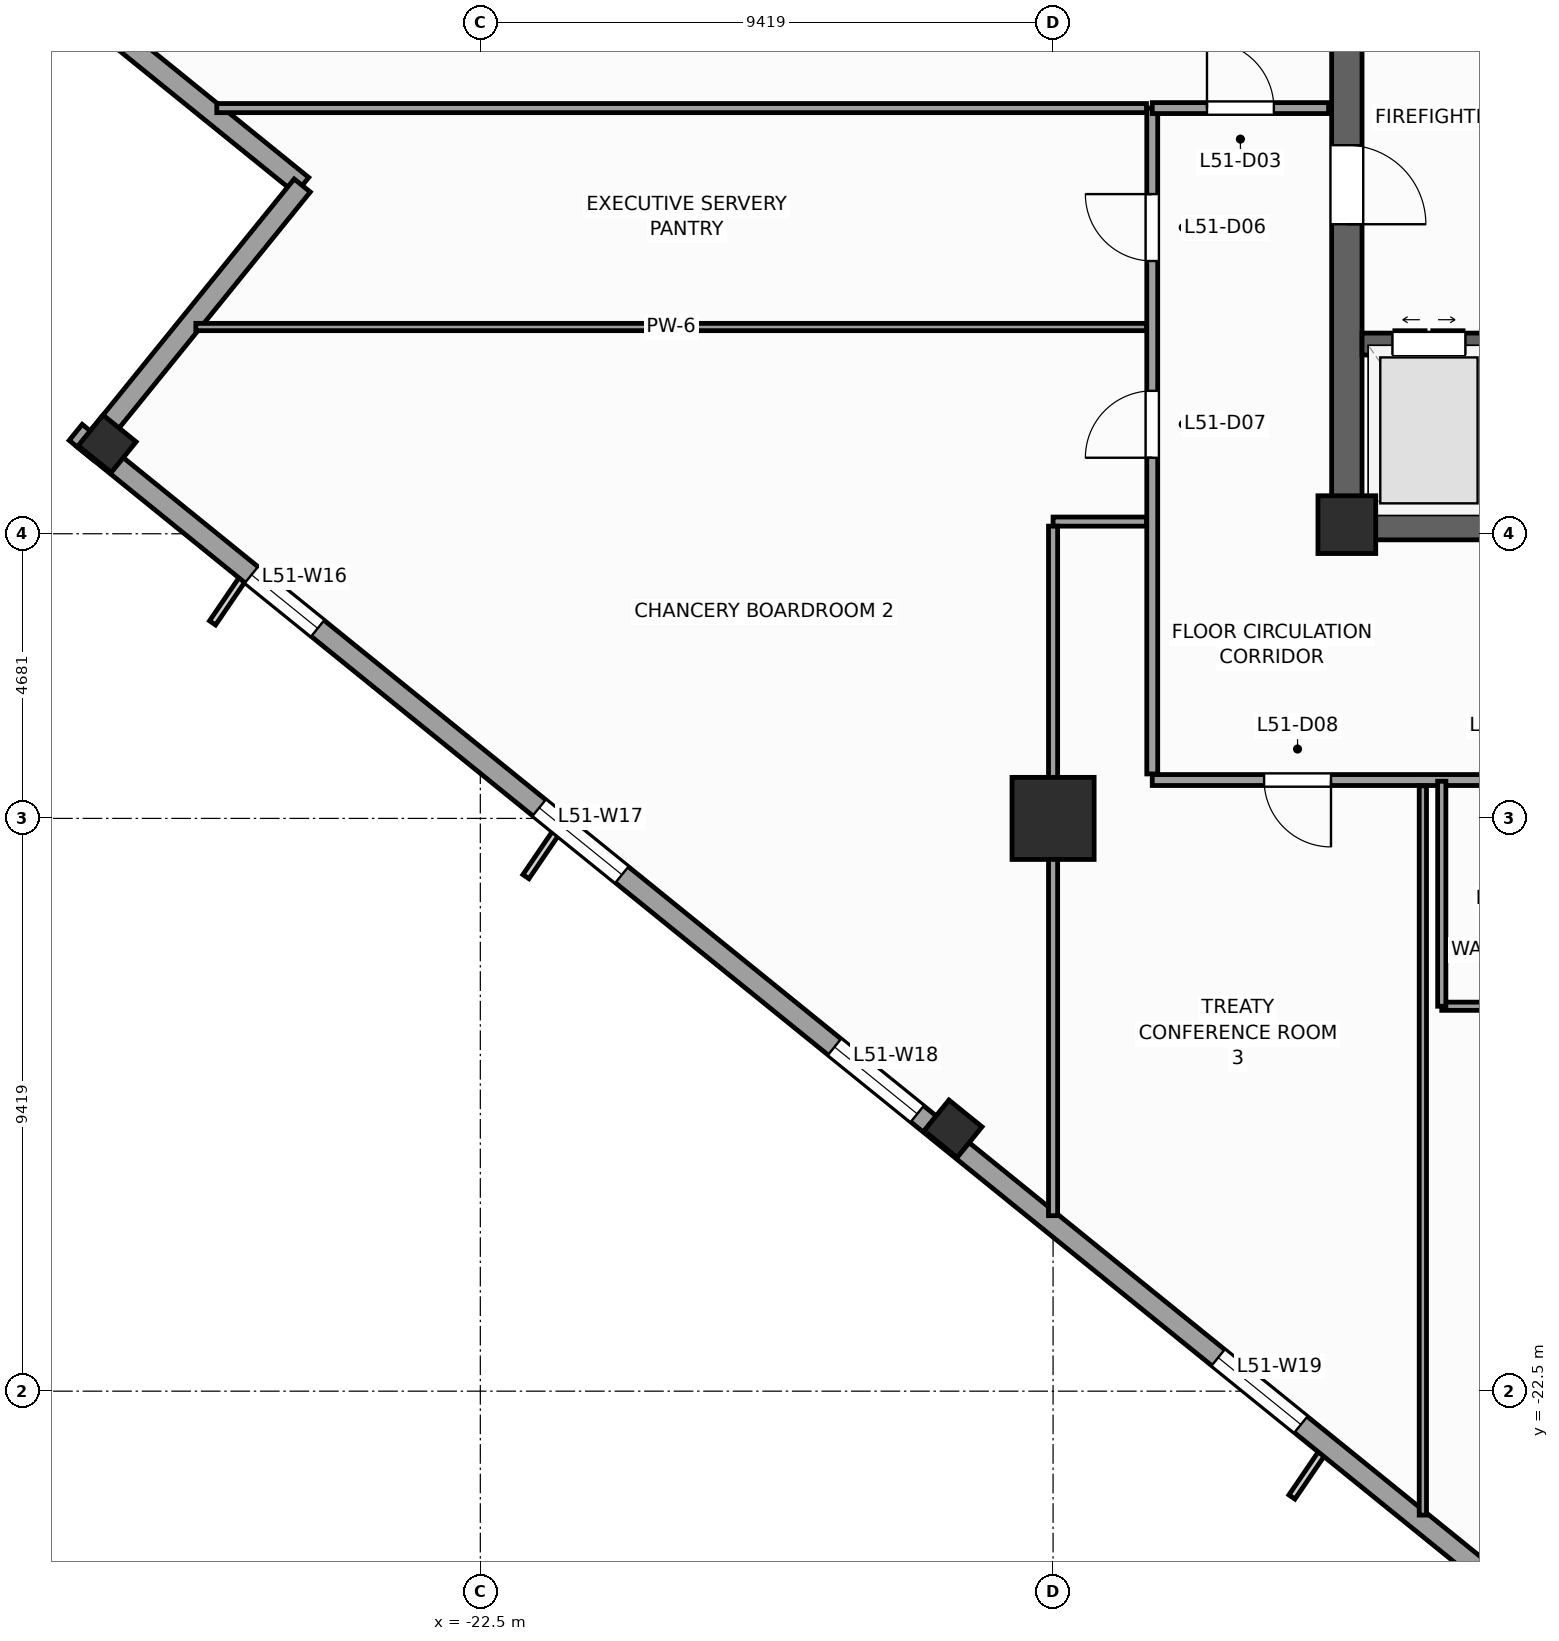
"""IFC4 building model, lengths in metres.
Left out: names, types, materials, properties, quantities, classifications, styles, units other than length and angle.
Written with IfcOpenShell. Run it as: python <this file> out.ifc"""

import sys

from ifc_helpers import new_model, si_unit, direction, frame, frame_2d, origin, origin_2d, place, context, subcontext, project, spatial, rectangle, extrude, source, transform, mapped, element, fill, save


model = new_model("IFC4")
c1 = context("Model", 3, precision=1e-05, world=origin(), true_north=direction((0.0, 1.0)))
c2 = subcontext(c1, "Body", "Model", "MODEL_VIEW")
j1 = project(units=[si_unit("LENGTHUNIT", "METRE"), si_unit("PLANEANGLEUNIT", "RADIAN")], contexts=[c1])
p1 = place(None, origin())
s1 = spatial("IfcSite", under=j1, at=p1, CompositionType="ELEMENT")
p2 = place(p1, origin())
s2 = spatial("IfcBuilding", under=s1, at=p2, CompositionType="ELEMENT")
p3 = place(p2, frame((0.0, 0.0, 213.4)))
s3 = spatial("IfcBuildingStorey", under=s2, at=p3, CompositionType="ELEMENT", Elevation=213.4)
p4 = place(p3, frame((-8.5, -8.25, 0.0), z_axis=(0.0, 0.0, 1.0), x_axis=(1.0, 0.0, 0.0)))
e1 = element("IfcWall", 1, at=p4, inside=s3, PredefinedType="SHEAR", context=c2, shape_type="SweptSolid", body=[
    extrude(rectangle(XDim=17.0, YDim=0.5, at=frame_2d((8.5, 0.0))), origin(), (0.0, 0.0, 1.0), 3.9),
])
p5 = place(p4, frame((7.85, 0.0, 0.0)))
e2 = element("IfcOpeningElement", 2, at=p5, cuts=e1, PredefinedType="OPENING", context=c2, shape_type="SweptSolid", body=[
    extrude(rectangle(XDim=1.3, YDim=2.2, at=frame_2d((0.65, 1.1))), frame((0.0, 0.26, 0.0), z_axis=(0.0, -1.0, 0.0), x_axis=(1.0, 0.0, 0.0)), (0.0, 0.0, 1.0), 0.52),
])
p6 = place(p3, frame((-8.25, -8.0, 0.0), z_axis=(0.0, 0.0, 1.0), x_axis=(0.0, 1.0, 0.0)))
e3 = element("IfcWall", 3, at=p6, inside=s3, PredefinedType="SHEAR", context=c2, shape_type="SweptSolid", body=[
    extrude(rectangle(XDim=16.0, YDim=0.5, at=frame_2d((8.0, 0.0))), origin(), (0.0, 0.0, 1.0), 3.9),
])
p7 = place(p6, frame((4.69, 0.0, 0.0)))
e4 = element("IfcOpeningElement", 4, at=p7, cuts=e3, PredefinedType="OPENING", context=c2, shape_type="SweptSolid", body=[
    extrude(rectangle(XDim=1.3, YDim=2.2, at=frame_2d((0.65, 1.1))), frame((0.0, 0.26, 0.0), z_axis=(0.0, -1.0, 0.0), x_axis=(1.0, 0.0, 0.0)), (0.0, 0.0, 1.0), 0.52),
])
p8 = place(p3, frame((-8.0, -5.28, 0.0), z_axis=(0.0, 0.0, 1.0), x_axis=(1.0, 0.0, 0.0)))
e5 = element("IfcWall", 5, at=p8, inside=s3, PredefinedType="SHEAR", context=c2, shape_type="SweptSolid", body=[
    extrude(rectangle(XDim=3.46, YDim=0.36, at=frame_2d((1.73, 0.0))), origin(), (0.0, 0.0, 1.0), 3.9),
])
p9 = place(p8, frame((0.5, 0.0, 0.0)))
e6 = element("IfcOpeningElement", 6, at=p9, cuts=e5, PredefinedType="OPENING", context=c2, shape_type="SweptSolid", body=[
    extrude(rectangle(XDim=1.2, YDim=2.25, at=frame_2d((0.6, 1.125))), frame((0.0, 0.19, 0.0), z_axis=(0.0, -1.0, 0.0), x_axis=(1.0, 0.0, 0.0)), (0.0, 0.0, 1.0), 0.38),
])
m1 = source(origin(), c2, "Body", "SweptSolid", [
    extrude(rectangle(XDim=0.95, YDim=0.95, at=origin_2d()), origin(), (0.0, 0.0, 1.0), 3.9),
])
p10 = place(p3, frame((-8.25, -8.25, 0.0), z_axis=(0.0, 0.0, 1.0), x_axis=(1.0, 0.0, 0.0)))
e7 = element("IfcColumn", 7, at=p10, inside=s3, PredefinedType="PILASTER", context=c2, shape_type="MappedRepresentation", body=[
    mapped(m1, transform((0.0, 0.0, 0.0), scale=1.0)),
])
m2 = source(origin(), c2, "Body", "SweptSolid", [
    extrude(rectangle(XDim=1.35, YDim=1.35, at=origin_2d()), origin(), (0.0, 0.0, 1.0), 3.9),
])
p11 = place(p3, frame((-13.081, -13.081, 0.0), z_axis=(0.0, 0.0, 1.0), x_axis=(1.0, 0.0, 0.0)))
e8 = element("IfcColumn", 8, at=p11, inside=s3, PredefinedType="COLUMN", context=c2, shape_type="MappedRepresentation", body=[
    mapped(m2, transform((0.0, 0.0, 0.0), scale=1.0)),
])
m3 = source(origin(), c2, "Body", "SweptSolid", [
    extrude(rectangle(XDim=0.65, YDim=0.7, at=origin_2d()), origin(), (0.0, 0.0, 1.0), 3.9),
])
for number, where, z_axis, x_axis in (
    (9, (-28.637, -6.92, 0.0), (0.0, 0.0, 1.0), (0.629, 0.777, 0.0)),
    (10, (-14.726, -18.185, 0.0), (0.0, 0.0, 1.0), (0.629, 0.777, 0.0)),
):
    element("IfcColumn", number, at=place(p3, frame(where, z_axis=z_axis, x_axis=x_axis)), inside=s3, PredefinedType="COLUMN", context=c2, shape_type="MappedRepresentation", body=[
        mapped(m3, transform((0.0, 0.0, 0.0), scale=1.0)),
    ])
p12 = place(p3, frame((-29.703, 0.789, 0.0), z_axis=(0.0, 0.0, 1.0), x_axis=(0.77714355312, -0.629323365087, 0.0)))
e11 = element("IfcWall", 11, at=p12, inside=s3, PredefinedType="STANDARD", context=c2, shape_type="SweptSolid", body=[
    extrude(rectangle(XDim=5.5, YDim=0.34, at=frame_2d((2.75, 0.0))), origin(), (0.0, 0.0, 1.0), 3.66),
])
p13 = place(p3, frame((-25.429, -2.673, 0.0), z_axis=(0.0, 0.0, 1.0), x_axis=(-0.629299794138, -0.777162640055, 0.0)))
e12 = element("IfcWall", 12, at=p13, inside=s3, PredefinedType="STANDARD", context=c2, shape_type="SweptSolid", body=[
    extrude(rectangle(XDim=5.67, YDim=0.34, at=frame_2d((2.835, 0.0))), origin(), (0.0, 0.0, 1.0), 3.66),
])
p14 = place(p3, frame((-29.154, -6.733, 0.0), z_axis=(0.0, 0.0, 1.0), x_axis=(0.77714192302, -0.629325378072, 0.0)))
e13 = element("IfcWall", 13, at=p14, inside=s3, PredefinedType="STANDARD", context=c2, shape_type="SweptSolid", body=[
    extrude(rectangle(XDim=36.84, YDim=0.34, at=frame_2d((18.42, 0.0))), origin(), (0.0, 0.0, 1.0), 2.96),
])
p15 = place(p14, frame((3.721, 0.0, 0.48)))
e14 = element("IfcOpeningElement", 14, at=p15, cuts=e13, PredefinedType="OPENING", context=c2, shape_type="SweptSolid", body=[
    extrude(rectangle(XDim=1.4, YDim=2.4, at=frame_2d((0.7, 1.2))), frame((0.0, 0.18, 0.0), z_axis=(0.0, -1.0, 0.0), x_axis=(1.0, 0.0, 0.0)), (0.0, 0.0, 1.0), 0.36),
])
p16 = place(p14, frame((9.809, 0.0, 0.58)))
e15 = element("IfcOpeningElement", 15, at=p16, cuts=e13, PredefinedType="OPENING", context=c2, shape_type="SweptSolid", body=[
    extrude(rectangle(XDim=1.75, YDim=2.3, at=frame_2d((0.875, 1.15))), frame((0.0, 0.18, 0.0), z_axis=(0.0, -1.0, 0.0), x_axis=(1.0, 0.0, 0.0)), (0.0, 0.0, 1.0), 0.36),
])
p17 = place(p14, frame((16.058, 0.0, 0.58)))
e16 = element("IfcOpeningElement", 16, at=p17, cuts=e13, PredefinedType="OPENING", context=c2, shape_type="SweptSolid", body=[
    extrude(rectangle(XDim=1.75, YDim=2.3, at=frame_2d((0.875, 1.15))), frame((0.0, 0.18, 0.0), z_axis=(0.0, -1.0, 0.0), x_axis=(1.0, 0.0, 0.0)), (0.0, 0.0, 1.0), 0.36),
])
p18 = place(p14, frame((24.176, 0.0, 0.58)))
e17 = element("IfcOpeningElement", 17, at=p18, cuts=e13, PredefinedType="OPENING", context=c2, shape_type="SweptSolid", body=[
    extrude(rectangle(XDim=1.75, YDim=2.3, at=frame_2d((0.875, 1.15))), frame((0.0, 0.18, 0.0), z_axis=(0.0, -1.0, 0.0), x_axis=(1.0, 0.0, 0.0)), (0.0, 0.0, 1.0), 0.36),
])
p19 = place(p14, frame((30.982, 0.0, 0.48)))
e18 = element("IfcOpeningElement", 18, at=p19, cuts=e13, PredefinedType="OPENING", context=c2, shape_type="SweptSolid", body=[
    extrude(rectangle(XDim=1.4, YDim=2.4, at=frame_2d((0.7, 1.2))), frame((0.0, 0.18, 0.0), z_axis=(0.0, -1.0, 0.0), x_axis=(1.0, 0.0, 0.0)), (0.0, 0.0, 1.0), 0.36),
])
p20 = place(p3, frame((-11.45, -12.45, 0.0), z_axis=(0.0, 0.0, 1.0), x_axis=(1.0, 0.0, 0.0)))
e19 = element("IfcWall", 19, at=p20, inside=s3, PredefinedType="PARTITIONING", context=c2, shape_type="SweptSolid", body=[
    extrude(rectangle(XDim=21.75, YDim=0.18, at=frame_2d((10.875, 0.0))), origin(), (0.0, 0.0, 1.0), 3.66),
])
p21 = place(p20, frame((5.411, 0.0, 0.0)))
e20 = element("IfcOpeningElement", 20, at=p21, cuts=e19, PredefinedType="OPENING", context=c2, shape_type="SweptSolid", body=[
    extrude(rectangle(XDim=0.95, YDim=2.1, at=frame_2d((0.475, 1.05))), frame((0.0, 0.1, 0.0), z_axis=(0.0, -1.0, 0.0), x_axis=(1.0, 0.0, 0.0)), (0.0, 0.0, 1.0), 0.2),
])
p22 = place(p20, frame((1.839, 0.0, 0.0)))
e21 = element("IfcOpeningElement", 21, at=p22, cuts=e19, PredefinedType="OPENING", context=c2, shape_type="SweptSolid", body=[
    extrude(rectangle(XDim=1.1, YDim=2.2, at=frame_2d((0.55, 1.1))), frame((0.0, 0.1, 0.0), z_axis=(0.0, -1.0, 0.0), x_axis=(1.0, 0.0, 0.0)), (0.0, 0.0, 1.0), 0.2),
])
p23 = place(p20, frame((7.574, 0.0, 0.0)))
e22 = element("IfcOpeningElement", 22, at=p23, cuts=e19, PredefinedType="OPENING", context=c2, shape_type="SweptSolid", body=[
    extrude(rectangle(XDim=1.1, YDim=2.2, at=frame_2d((0.55, 1.1))), frame((0.0, 0.1, 0.0), z_axis=(0.0, -1.0, 0.0), x_axis=(1.0, 0.0, 0.0)), (0.0, 0.0, 1.0), 0.2),
])
p24 = place(p20, frame((11.05, 0.0, 0.0)))
e23 = element("IfcOpeningElement", 23, at=p24, cuts=e19, PredefinedType="OPENING", context=c2, shape_type="SweptSolid", body=[
    extrude(rectangle(XDim=1.1, YDim=2.2, at=frame_2d((0.55, 1.1))), frame((0.0, 0.1, 0.0), z_axis=(0.0, -1.0, 0.0), x_axis=(1.0, 0.0, 0.0)), (0.0, 0.0, 1.0), 0.2),
])
p25 = place(p20, frame((15.65, 0.0, 0.0)))
e24 = element("IfcOpeningElement", 24, at=p25, cuts=e19, PredefinedType="OPENING", context=c2, shape_type="SweptSolid", body=[
    extrude(rectangle(XDim=1.1, YDim=2.2, at=frame_2d((0.55, 1.1))), frame((0.0, 0.1, 0.0), z_axis=(0.0, -1.0, 0.0), x_axis=(1.0, 0.0, 0.0)), (0.0, 0.0, 1.0), 0.2),
])
p26 = place(p3, frame((-11.45, -12.35, 0.0), z_axis=(0.0, 0.0, 1.0), x_axis=(0.0, 1.0, 0.0)))
e25 = element("IfcWall", 25, at=p26, inside=s3, PredefinedType="PARTITIONING", context=c2, shape_type="SweptSolid", body=[
    extrude(rectangle(XDim=10.95, YDim=0.18, at=frame_2d((5.475, 0.0))), origin(), (0.0, 0.0, 1.0), 3.66),
])
p27 = place(p26, frame((8.436, 0.0, 0.0)))
e26 = element("IfcOpeningElement", 26, at=p27, cuts=e25, PredefinedType="OPENING", context=c2, shape_type="SweptSolid", body=[
    extrude(rectangle(XDim=1.1, YDim=2.2, at=frame_2d((0.55, 1.1))), frame((0.0, 0.1, 0.0), z_axis=(0.0, -1.0, 0.0), x_axis=(1.0, 0.0, 0.0)), (0.0, 0.0, 1.0), 0.2),
])
p28 = place(p26, frame((5.2, 0.0, 0.0)))
e27 = element("IfcOpeningElement", 27, at=p28, cuts=e25, PredefinedType="OPENING", context=c2, shape_type="SweptSolid", body=[
    extrude(rectangle(XDim=1.1, YDim=2.2, at=frame_2d((0.55, 1.1))), frame((0.0, 0.1, 0.0), z_axis=(0.0, -1.0, 0.0), x_axis=(1.0, 0.0, 0.0)), (0.0, 0.0, 1.0), 0.2),
])
p29 = place(p3, frame((-11.45, -1.4, 0.0), z_axis=(0.0, 0.0, 1.0), x_axis=(1.0, 0.0, 0.0)))
e28 = element("IfcWall", 28, at=p29, inside=s3, PredefinedType="PARTITIONING", context=c2, shape_type="SweptSolid", body=[
    extrude(rectangle(XDim=2.9, YDim=0.18, at=frame_2d((1.45, 0.0))), origin(), (0.0, 0.0, 1.0), 3.66),
])
p30 = place(p29, frame((0.9, 0.0, 0.0)))
e29 = element("IfcOpeningElement", 29, at=p30, cuts=e28, PredefinedType="OPENING", context=c2, shape_type="SweptSolid", body=[
    extrude(rectangle(XDim=1.1, YDim=2.2, at=frame_2d((0.55, 1.1))), frame((0.0, 0.1, 0.0), z_axis=(0.0, -1.0, 0.0), x_axis=(1.0, 0.0, 0.0)), (0.0, 0.0, 1.0), 0.2),
])
p31 = place(p3, frame((-26.834, -1.4, 0.0), z_axis=(0.0, 0.0, 1.0), x_axis=(1.0, 0.0, 0.0)))
e30 = element("IfcWall", 30, at=p31, inside=s3, PredefinedType="PARTITIONING", context=c2, shape_type="SweptSolid", body=[
    extrude(rectangle(XDim=15.289, YDim=0.15, at=frame_2d((7.645, 0.0))), origin(), (0.0, 0.0, 1.0), 3.66),
])
p32 = place(p3, frame((-11.545, -8.2, 0.0), z_axis=(0.0, 0.0, 1.0), x_axis=(-1.0, 0.0, 0.0)))
e31 = element("IfcWall", 31, at=p32, inside=s3, PredefinedType="PARTITIONING", context=c2, shape_type="SweptSolid", body=[
    extrude(rectangle(XDim=1.536, YDim=0.15, at=frame_2d((0.768, 0.0))), origin(), (0.0, 0.0, 1.0), 3.66),
])
p33 = place(p3, frame((-13.081, -8.275, 0.0), z_axis=(0.0, 0.0, 1.0), x_axis=(0.0, -1.0, 0.0)))
e32 = element("IfcWall", 32, at=p33, inside=s3, PredefinedType="PARTITIONING", context=c2, shape_type="SweptSolid", body=[
    extrude(rectangle(XDim=11.339, YDim=0.15, at=frame_2d((5.669, 0.0))), origin(), (0.0, 0.0, 1.0), 2.76),
])
p34 = place(p3, frame((-27.178, -5.0, 0.0), z_axis=(0.0, 0.0, 1.0), x_axis=(1.0, 0.0, 0.0)))
e33 = element("IfcWall", 33, at=p34, inside=s3, PredefinedType="PARTITIONING", context=c2, shape_type="SweptSolid", body=[
    extrude(rectangle(XDim=15.634, YDim=0.12, at=frame_2d((7.817, 0.0))), origin(), (0.0, 0.0, 1.0), 3.66),
])
p35 = place(p3, frame((-7.0, -24.538, 0.0), z_axis=(0.0, 0.0, 1.0), x_axis=(0.0, 1.0, 0.0)))
e34 = element("IfcWall", 34, at=p35, inside=s3, PredefinedType="PARTITIONING", context=c2, shape_type="SweptSolid", body=[
    extrude(rectangle(XDim=11.993, YDim=0.12, at=frame_2d((5.997, 0.0))), origin(), (0.0, 0.0, 1.0), 3.66),
])
p36 = place(p3, frame((-6.689, -16.17, 0.0), z_axis=(0.0, 0.0, 1.0), x_axis=(1.0, 0.0, 0.0)))
e35 = element("IfcWall", 35, at=p36, inside=s3, PredefinedType="PARTITIONING", context=c2, shape_type="SweptSolid", body=[
    extrude(rectangle(XDim=2.25, YDim=0.135, at=frame_2d((1.125, 0.0))), origin(), (0.0, 0.0, 1.0), 3.66),
])
p37 = place(p3, frame((-6.689, -16.17, 0.0), z_axis=(0.0, 0.0, 1.0), x_axis=(0.0, 1.0, 0.0)))
e36 = element("IfcWall", 36, at=p37, inside=s3, PredefinedType="PARTITIONING", context=c2, shape_type="SweptSolid", body=[
    extrude(rectangle(XDim=3.7, YDim=0.135, at=frame_2d((1.85, 0.0))), origin(), (0.0, 0.0, 1.0), 3.66),
])
m4 = source(origin(), c2, "Body", "SweptSolid", [
    extrude(rectangle(XDim=1.4, YDim=2.4, at=frame_2d((0.7, 1.2))), frame((0.0, 0.03, 0.0), z_axis=(0.0, -1.0, 0.0), x_axis=(1.0, 0.0, 0.0)), (0.0, 0.0, 1.0), 0.06),
])
p38 = place(p15, origin())
e37 = element("IfcWindow", 37, at=p38, inside=s3, PartitioningType="SINGLE_PANEL", PredefinedType="WINDOW", context=c2, shape_type="MappedRepresentation", body=[
    mapped(m4, transform((0.0, 0.0, 0.0), scale=1.0)),
])
fill(e14, e37)
m5 = source(origin(), c2, "Body", "SweptSolid", [
    extrude(rectangle(XDim=1.75, YDim=2.3, at=frame_2d((0.875, 1.15))), frame((0.0, 0.03, 0.0), z_axis=(0.0, -1.0, 0.0), x_axis=(1.0, 0.0, 0.0)), (0.0, 0.0, 1.0), 0.06),
])
p39 = place(p16, origin())
e38 = element("IfcWindow", 38, at=p39, inside=s3, PartitioningType="SINGLE_PANEL", PredefinedType="WINDOW", context=c2, shape_type="MappedRepresentation", body=[
    mapped(m5, transform((0.0, 0.0, 0.0), scale=1.0)),
])
fill(e15, e38)
p40 = place(p17, origin())
e39 = element("IfcWindow", 39, at=p40, inside=s3, PartitioningType="SINGLE_PANEL", PredefinedType="WINDOW", context=c2, shape_type="MappedRepresentation", body=[
    mapped(m5, transform((0.0, 0.0, 0.0), scale=1.0)),
])
fill(e16, e39)
p41 = place(p18, origin())
e40 = element("IfcWindow", 40, at=p41, inside=s3, PartitioningType="SINGLE_PANEL", PredefinedType="WINDOW", context=c2, shape_type="MappedRepresentation", body=[
    mapped(m5, transform((0.0, 0.0, 0.0), scale=1.0)),
])
fill(e17, e40)
m6 = source(origin(), c2, "Body", "SweptSolid", [
    extrude(rectangle(XDim=1.3, YDim=2.2, at=frame_2d((0.65, 1.1))), frame((0.0, 0.025, 0.0), z_axis=(0.0, -1.0, 0.0), x_axis=(1.0, 0.0, 0.0)), (0.0, 0.0, 1.0), 0.05),
])
p42 = place(p7, frame((1.3, 0.0, 0.0), z_axis=(0.0, 0.0, 1.0), x_axis=(-1.0, 0.0, 0.0)))
e41 = element("IfcDoor", 41, at=p42, inside=s3, OperationType="SINGLE_SWING_LEFT", PredefinedType="DOOR", context=c2, shape_type="MappedRepresentation", body=[
    mapped(m6, transform((0.0, 0.0, 0.0), scale=1.0)),
])
fill(e4, e41)
m7 = source(origin(), c2, "Body", "SweptSolid", [
    extrude(rectangle(XDim=1.2, YDim=2.25, at=frame_2d((0.6, 1.125))), frame((0.0, 0.025, 0.0), z_axis=(0.0, -1.0, 0.0), x_axis=(1.0, 0.0, 0.0)), (0.0, 0.0, 1.0), 0.05),
])
p43 = place(p9, origin())
e42 = element("IfcDoor", 42, at=p43, inside=s3, OperationType="DOUBLE_DOOR_SLIDING", PredefinedType="DOOR", context=c2, shape_type="MappedRepresentation", body=[
    mapped(m7, transform((0.0, 0.0, 0.0), scale=1.0)),
])
fill(e6, e42)
m8 = source(origin(), c2, "Body", "SweptSolid", [
    extrude(rectangle(XDim=1.1, YDim=2.2, at=frame_2d((0.55, 1.1))), frame((0.0, 0.025, 0.0), z_axis=(0.0, -1.0, 0.0), x_axis=(1.0, 0.0, 0.0)), (0.0, 0.0, 1.0), 0.05),
])
p44 = place(p30, origin())
e43 = element("IfcDoor", 43, at=p44, inside=s3, OperationType="SINGLE_SWING_LEFT", PredefinedType="DOOR", context=c2, shape_type="MappedRepresentation", body=[
    mapped(m8, transform((0.0, 0.0, 0.0), scale=1.0)),
])
fill(e29, e43)
p45 = place(p27, origin())
e44 = element("IfcDoor", 44, at=p45, inside=s3, OperationType="SINGLE_SWING_RIGHT", PredefinedType="DOOR", context=c2, shape_type="MappedRepresentation", body=[
    mapped(m8, transform((0.0, 0.0, 0.0), scale=1.0)),
])
fill(e26, e44)
p46 = place(p28, origin())
e45 = element("IfcDoor", 45, at=p46, inside=s3, OperationType="SINGLE_SWING_LEFT", PredefinedType="DOOR", context=c2, shape_type="MappedRepresentation", body=[
    mapped(m8, transform((0.0, 0.0, 0.0), scale=1.0)),
])
fill(e27, e45)
p47 = place(p22, frame((1.1, 0.0, 0.0), z_axis=(0.0, 0.0, 1.0), x_axis=(-1.0, 0.0, 0.0)))
e46 = element("IfcDoor", 46, at=p47, inside=s3, OperationType="SINGLE_SWING_RIGHT", PredefinedType="DOOR", context=c2, shape_type="MappedRepresentation", body=[
    mapped(m8, transform((0.0, 0.0, 0.0), scale=1.0)),
])
fill(e21, e46)
save(model, sys.argv[1])
